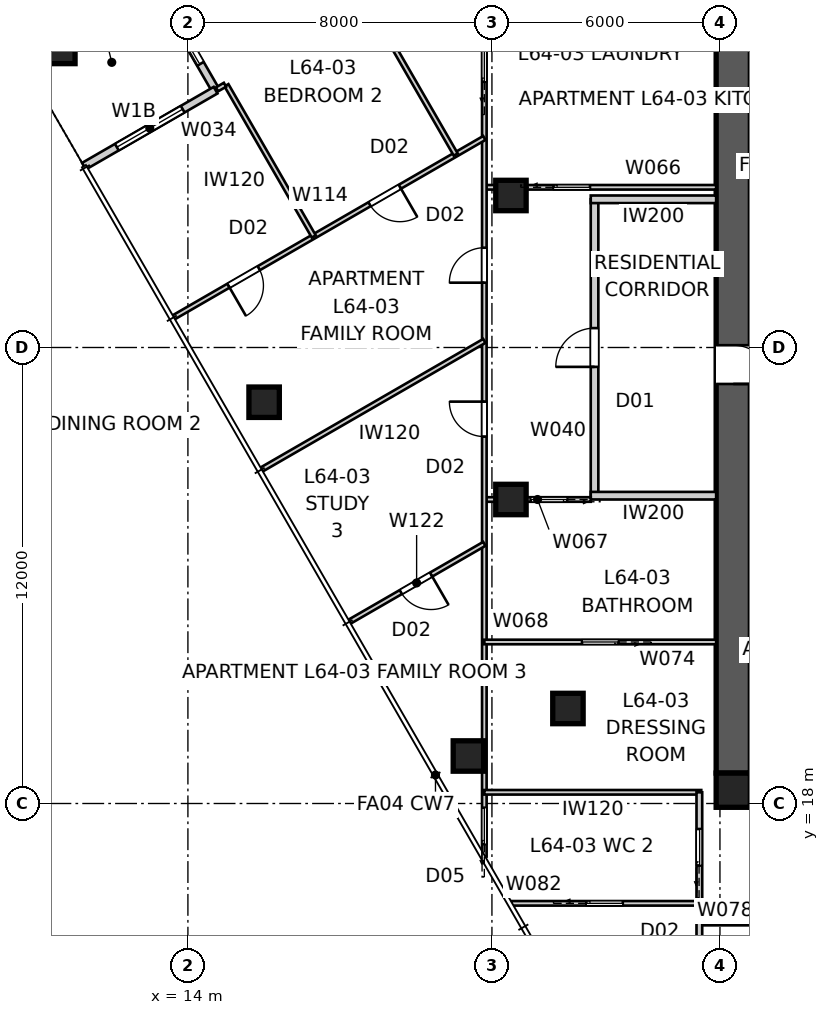
"""IFC4 building model, lengths in metres.
Left out: names, types, materials, properties, quantities, classifications, styles, units other than length and angle.
Written with IfcOpenShell. Run it as: python <this file> out.ifc"""

import sys

from ifc_helpers import new_model, si_unit, direction, frame, frame_2d, origin, origin_2d, place, context, subcontext, project, spatial, polyline, rectangle, outline, extrude, element, fill, save


model = new_model("IFC4")
c1 = context("Model", 3, precision=1e-05, world=origin(), true_north=direction((0.0, 1.0)))
c2 = subcontext(c1, "Body", "Model", "MODEL_VIEW")
j1 = project(units=[si_unit("LENGTHUNIT", "METRE"), si_unit("PLANEANGLEUNIT", "RADIAN")], contexts=[c1])
p1 = place(None, origin())
s1 = spatial("IfcSite", under=j1, at=p1, CompositionType="ELEMENT")
p2 = place(p1, origin())
s2 = spatial("IfcBuilding", under=s1, at=p2, CompositionType="ELEMENT")
p3 = place(p2, frame((0.0, 0.0, 232.0)))
s3 = spatial("IfcBuildingStorey", under=s2, at=p3, CompositionType="ELEMENT", Elevation=232.0)
p4 = place(p3, frame((51.2, 18.35, 0.0), z_axis=(0.0, 0.0, 1.0), x_axis=(-1.0, 0.0, 0.0)))
e1 = element("IfcWall", 1, at=p4, inside=s3, PredefinedType="SHEAR", context=c2, shape_type="SweptSolid", body=[
    extrude(outline(polyline([(0.0, -0.45), (22.4, -0.45), (22.4, -0.025), (22.85, -0.025), (22.85, 0.025), (22.4, 0.025), (22.4, 0.45), (0.0, 0.45), (0.0, 0.025), (-0.45, 0.025), (-0.45, -0.025), (0.0, -0.025), (0.0, -0.45)])), origin(), (0.0, 0.0, 1.0), 3.4),
])
p5 = place(p3, frame((28.35, 41.2, 0.0), z_axis=(0.0, 0.0, 1.0), x_axis=(0.0, -1.0, 0.0)))
e2 = element("IfcWall", 2, at=p5, inside=s3, PredefinedType="SHEAR", context=c2, shape_type="SweptSolid", body=[
    extrude(outline(polyline([(0.0, -0.45), (22.4, -0.45), (22.4, -0.025), (22.85, -0.025), (22.85, 0.025), (22.4, 0.025), (22.4, 0.45), (0.0, 0.45), (0.0, 0.025), (-0.45, 0.025), (-0.45, -0.025), (0.0, -0.025), (0.0, -0.45)])), origin(), (0.0, 0.0, 1.0), 3.4),
])
p6 = place(p5, frame((11.14, 0.0, 0.0)))
e3 = element("IfcOpeningElement", 3, at=p6, cuts=e2, PredefinedType="OPENING", context=c2, shape_type="SweptSolid", body=[
    extrude(rectangle(XDim=1.02, YDim=2.4, at=frame_2d((0.51, 1.2))), frame((0.0, 0.46, 0.0), z_axis=(0.0, -1.0, 0.0), x_axis=(1.0, 0.0, 0.0)), (0.0, 0.0, 1.0), 0.92),
])
p7 = place(p3, frame((28.35, 18.35, 0.0), z_axis=(0.0, 0.0, 1.0), x_axis=(1.0, 0.0, 0.0)))
e4 = element("IfcColumn", 4, at=p7, inside=s3, PredefinedType="COLUMN", context=c2, shape_type="SweptSolid", body=[
    extrude(rectangle(XDim=0.9, YDim=0.9, at=origin_2d()), origin(), (0.0, 0.0, 1.0), 3.4),
])
for number, where, z_axis, x_axis in (
    (5, (10.63, 37.87, 0.0), (0.0, 0.0, 1.0), (1.0, 0.0, 0.0)),
    (6, (16.005, 28.56, 0.0), (0.0, 0.0, 1.0), (1.0, 0.0, 0.0)),
    (7, (21.38, 19.25, 0.0), (0.0, 0.0, 1.0), (1.0, 0.0, 0.0)),
):
    element("IfcColumn", number, at=place(p3, frame(where, z_axis=z_axis, x_axis=x_axis)), inside=s3, PredefinedType="COLUMN", context=c2, shape_type="SweptSolid", body=[
        extrude(rectangle(XDim=0.8, YDim=0.8, at=origin_2d()), origin(), (0.0, 0.0, 1.0), 3.2),
    ])
for number, where, z_axis, x_axis in (
    (8, (22.5, 34.0, 0.0), (0.0, 0.0, 1.0), (1.0, 0.0, 0.0)),
    (9, (22.5, 26.0, 0.0), (0.0, 0.0, 1.0), (1.0, 0.0, 0.0)),
    (10, (24.0, 20.5, 0.0), (0.0, 0.0, 1.0), (1.0, 0.0, 0.0)),
):
    element("IfcColumn", number, at=place(p3, frame(where, z_axis=z_axis, x_axis=x_axis)), inside=s3, PredefinedType="COLUMN", context=c2, shape_type="SweptSolid", body=[
        extrude(rectangle(XDim=0.8, YDim=0.8, at=origin_2d()), origin(), (0.0, 0.0, 1.0), 3.4),
    ])
p8 = place(p3, frame((12.729, 40.236, 0.0), z_axis=(0.0, 0.0, 1.0), x_axis=(0.49999894854, -0.866026010844, 0.0)))
e11 = element("IfcWall", 11, at=p8, inside=s3, PredefinedType="SOLIDWALL", context=c2, shape_type="SweptSolid", body=[
    extrude(rectangle(XDim=4.0, YDim=0.2, at=frame_2d((2.0, 0.0))), origin(), (0.0, 0.0, 1.0), 3.2),
])
p9 = place(p8, frame((0.8, 0.0, 0.0)))
e12 = element("IfcOpeningElement", 12, at=p9, cuts=e11, PredefinedType="OPENING", context=c2, shape_type="SweptSolid", body=[
    extrude(rectangle(XDim=2.4, YDim=2.1, at=frame_2d((1.2, 1.05))), frame((0.0, 0.11, 0.0), z_axis=(0.0, -1.0, 0.0), x_axis=(1.0, 0.0, 0.0)), (0.0, 0.0, 1.0), 0.22),
])
p10 = place(p3, frame((14.729, 36.771, 0.0), z_axis=(0.0, 0.0, 1.0), x_axis=(-0.866026010844, -0.49999894854, 0.0)))
e13 = element("IfcWall", 13, at=p10, inside=s3, PredefinedType="SOLIDWALL", context=c2, shape_type="SweptSolid", body=[
    extrude(rectangle(XDim=4.0, YDim=0.2, at=frame_2d((2.0, 0.0))), origin(), (0.0, 0.0, 1.0), 3.2),
])
p11 = place(p10, frame((1.0, 0.0, 0.4)))
e14 = element("IfcOpeningElement", 14, at=p11, cuts=e13, PredefinedType="OPENING", context=c2, shape_type="SweptSolid", body=[
    extrude(rectangle(XDim=2.0, YDim=1.8, at=frame_2d((1.0, 0.9))), frame((0.0, 0.11, 0.0), z_axis=(0.0, -1.0, 0.0), x_axis=(1.0, 0.0, 0.0)), (0.0, 0.0, 1.0), 0.22),
])
p12 = place(p3, frame((24.7, 26.1, 0.0), z_axis=(0.0, 0.0, 1.0), x_axis=(0.0, 1.0, 0.0)))
e15 = element("IfcWall", 15, at=p12, inside=s3, PredefinedType="PARTITIONING", context=c2, shape_type="SweptSolid", body=[
    extrude(rectangle(XDim=7.8, YDim=0.2, at=frame_2d((3.9, 0.0))), origin(), (0.0, 0.0, 1.0), 3.2),
])
p13 = place(p12, frame((3.39, 0.0, 0.0)))
e16 = element("IfcOpeningElement", 16, at=p13, cuts=e15, PredefinedType="OPENING", context=c2, shape_type="SweptSolid", body=[
    extrude(rectangle(XDim=1.02, YDim=2.34, at=frame_2d((0.51, 1.17))), frame((0.0, 0.11, 0.0), z_axis=(0.0, -1.0, 0.0), x_axis=(1.0, 0.0, 0.0)), (0.0, 0.0, 1.0), 0.22),
])
for number, where, z_axis, x_axis in (
    (17, (27.9, 33.9, 0.0), (0.0, 0.0, 1.0), (-1.0, 0.0, 0.0)),
    (18, (27.9, 26.1, 0.0), (0.0, 0.0, 1.0), (-1.0, 0.0, 0.0)),
):
    element("IfcWall", number, at=place(p3, frame(where, z_axis=z_axis, x_axis=x_axis)), inside=s3, PredefinedType="PARTITIONING", context=c2, shape_type="SweptSolid", body=[
        extrude(rectangle(XDim=3.3, YDim=0.2, at=frame_2d((1.65, 0.0))), origin(), (0.0, 0.0, 1.0), 3.2),
    ])
p14 = place(p3, frame((21.8, 34.216, 0.0), z_axis=(0.0, 0.0, 1.0), x_axis=(1.0, 0.0, 0.0)))
e19 = element("IfcWall", 19, at=p14, inside=s3, PredefinedType="PARTITIONING", context=c2, shape_type="SweptSolid", body=[
    extrude(rectangle(XDim=6.1, YDim=0.12, at=frame_2d((3.05, 0.0))), origin(), (0.0, 0.0, 1.0), 3.2),
])
p15 = place(p14, frame((1.82, 0.0, 0.0)))
e20 = element("IfcOpeningElement", 20, at=p15, cuts=e19, PredefinedType="OPENING", context=c2, shape_type="SweptSolid", body=[
    extrude(rectangle(XDim=0.96, YDim=2.1, at=frame_2d((0.48, 1.05))), frame((0.0, 0.07, 0.0), z_axis=(0.0, -1.0, 0.0), x_axis=(1.0, 0.0, 0.0)), (0.0, 0.0, 1.0), 0.14),
])
p16 = place(p3, frame((24.6, 26.0, 0.0), z_axis=(0.0, 0.0, 1.0), x_axis=(-1.0, 0.0, 0.0)))
e21 = element("IfcWall", 21, at=p16, inside=s3, PredefinedType="PARTITIONING", context=c2, shape_type="SweptSolid", body=[
    extrude(rectangle(XDim=2.8, YDim=0.12, at=frame_2d((1.4, 0.0))), origin(), (0.0, 0.0, 1.0), 3.2),
])
p17 = place(p16, frame((0.62, 0.0, 0.0)))
e22 = element("IfcOpeningElement", 22, at=p17, cuts=e21, PredefinedType="OPENING", context=c2, shape_type="SweptSolid", body=[
    extrude(rectangle(XDim=0.96, YDim=2.1, at=frame_2d((0.48, 1.05))), frame((0.0, 0.07, 0.0), z_axis=(0.0, -1.0, 0.0), x_axis=(1.0, 0.0, 0.0)), (0.0, 0.0, 1.0), 0.14),
])
p18 = place(p3, frame((21.8, 16.603, 0.0), z_axis=(0.0, 0.0, 1.0), x_axis=(0.0, 1.0, 0.0)))
e23 = element("IfcWall", 23, at=p18, inside=s3, PredefinedType="PARTITIONING", context=c2, shape_type="SweptSolid", body=[
    extrude(rectangle(XDim=28.823, YDim=0.12, at=frame_2d((14.412, 0.0))), origin(), (0.0, 0.0, 1.0), 3.2),
])
p19 = place(p18, frame((11.052, 0.0, 0.0)))
e24 = element("IfcOpeningElement", 24, at=p19, cuts=e23, PredefinedType="OPENING", context=c2, shape_type="SweptSolid", body=[
    extrude(rectangle(XDim=0.92, YDim=2.34, at=frame_2d((0.46, 1.17))), frame((0.0, 0.07, 0.0), z_axis=(0.0, -1.0, 0.0), x_axis=(1.0, 0.0, 0.0)), (0.0, 0.0, 1.0), 0.14),
])
p20 = place(p18, frame((15.102, 0.0, 0.0)))
e25 = element("IfcOpeningElement", 25, at=p20, cuts=e23, PredefinedType="OPENING", context=c2, shape_type="SweptSolid", body=[
    extrude(rectangle(XDim=0.92, YDim=2.34, at=frame_2d((0.46, 1.17))), frame((0.0, 0.07, 0.0), z_axis=(0.0, -1.0, 0.0), x_axis=(1.0, 0.0, 0.0)), (0.0, 0.0, 1.0), 0.14),
])
p21 = place(p18, frame((20.389, 0.0, 0.0)))
e26 = element("IfcOpeningElement", 26, at=p21, cuts=e23, PredefinedType="OPENING", context=c2, shape_type="SweptSolid", body=[
    extrude(rectangle(XDim=0.96, YDim=2.1, at=frame_2d((0.48, 1.05))), frame((0.0, 0.07, 0.0), z_axis=(0.0, -1.0, 0.0), x_axis=(1.0, 0.0, 0.0)), (0.0, 0.0, 1.0), 0.14),
])
p22 = place(p18, frame((0.326, 0.0, 0.0)))
e27 = element("IfcOpeningElement", 27, at=p22, cuts=e23, PredefinedType="OPENING", context=c2, shape_type="SweptSolid", body=[
    extrude(rectangle(XDim=0.96, YDim=2.1, at=frame_2d((0.48, 1.05))), frame((0.0, 0.07, 0.0), z_axis=(0.0, -1.0, 0.0), x_axis=(1.0, 0.0, 0.0)), (0.0, 0.0, 1.0), 0.14),
])
p23 = place(p3, frame((27.9, 22.25, 0.0), z_axis=(0.0, 0.0, 1.0), x_axis=(-1.0, 0.0, 0.0)))
e28 = element("IfcWall", 28, at=p23, inside=s3, PredefinedType="PARTITIONING", context=c2, shape_type="SweptSolid", body=[
    extrude(rectangle(XDim=6.1, YDim=0.12, at=frame_2d((3.05, 0.0))), origin(), (0.0, 0.0, 1.0), 3.2),
])
p24 = place(p23, frame((2.57, 0.0, 0.0)))
e29 = element("IfcOpeningElement", 29, at=p24, cuts=e28, PredefinedType="OPENING", context=c2, shape_type="SweptSolid", body=[
    extrude(rectangle(XDim=0.96, YDim=2.1, at=frame_2d((0.48, 1.05))), frame((0.0, 0.07, 0.0), z_axis=(0.0, -1.0, 0.0), x_axis=(1.0, 0.0, 0.0)), (0.0, 0.0, 1.0), 0.14),
])
p25 = place(p3, frame((27.508, 18.295, 0.0), z_axis=(0.0, 0.0, 1.0), x_axis=(-1.0, 0.0, 0.0)))
e30 = element("IfcWall", 30, at=p25, inside=s3, PredefinedType="PARTITIONING", context=c2, shape_type="SweptSolid", body=[
    extrude(rectangle(XDim=5.708, YDim=0.12, at=frame_2d((2.854, 0.0))), origin(), (0.0, 0.0, 1.0), 3.2),
])
p26 = place(p3, frame((32.361, 14.869, 0.0), z_axis=(0.0, 0.0, 1.0), x_axis=(-1.0, 0.0, 0.0)))
e31 = element("IfcWall", 31, at=p26, inside=s3, PredefinedType="SOLIDWALL", context=c2, shape_type="SweptSolid", body=[
    extrude(rectangle(XDim=4.903, YDim=0.15, at=frame_2d((2.452, 0.0))), origin(), (0.0, 0.0, 1.0), 3.2),
])
p27 = place(p3, frame((27.458, 11.8, 0.0), z_axis=(0.0, 0.0, 1.0), x_axis=(0.0, 1.0, 0.0)))
e32 = element("IfcWall", 32, at=p27, inside=s3, PredefinedType="SOLIDWALL", context=c2, shape_type="SweptSolid", body=[
    extrude(rectangle(XDim=6.495, YDim=0.15, at=frame_2d((3.248, 0.0))), origin(), (0.0, 0.0, 1.0), 3.2),
])
p28 = place(p27, frame((4.569, 0.0, 0.0)))
e33 = element("IfcOpeningElement", 33, at=p28, cuts=e32, PredefinedType="OPENING", context=c2, shape_type="SweptSolid", body=[
    extrude(rectangle(XDim=0.96, YDim=2.0, at=frame_2d((0.48, 1.0))), frame((0.0, 0.085, 0.0), z_axis=(0.0, -1.0, 0.0), x_axis=(1.0, 0.0, 0.0)), (0.0, 0.0, 1.0), 0.17),
])
p29 = place(p27, frame((1.074, 0.0, 0.0)))
e34 = element("IfcOpeningElement", 34, at=p29, cuts=e32, PredefinedType="OPENING", context=c2, shape_type="SweptSolid", body=[
    extrude(rectangle(XDim=0.92, YDim=2.34, at=frame_2d((0.46, 1.17))), frame((0.0, 0.085, 0.0), z_axis=(0.0, -1.0, 0.0), x_axis=(1.0, 0.0, 0.0)), (0.0, 0.0, 1.0), 0.17),
])
p30 = place(p3, frame((22.51, 15.373, 0.0), z_axis=(0.0, 0.0, 1.0), x_axis=(1.0, 0.0, 0.0)))
e35 = element("IfcWall", 35, at=p30, inside=s3, PredefinedType="PARTITIONING", context=c2, shape_type="SweptSolid", body=[
    extrude(rectangle(XDim=4.918, YDim=0.12, at=frame_2d((2.459, 0.0))), origin(), (0.0, 0.0, 1.0), 3.2),
])
p31 = place(p30, frame((1.973, 0.0, 0.0)))
e36 = element("IfcOpeningElement", 36, at=p31, cuts=e35, PredefinedType="OPENING", context=c2, shape_type="SweptSolid", body=[
    extrude(rectangle(XDim=0.96, YDim=2.1, at=frame_2d((0.48, 1.05))), frame((0.0, 0.07, 0.0), z_axis=(0.0, -1.0, 0.0), x_axis=(1.0, 0.0, 0.0)), (0.0, 0.0, 1.0), 0.14),
])
p32 = place(p3, frame((21.8, 35.514, 0.0), z_axis=(0.0, 0.0, 1.0), x_axis=(-0.86602907136, -0.49999364752, 0.0)))
e37 = element("IfcWall", 37, at=p32, inside=s3, PredefinedType="PARTITIONING", context=c2, shape_type="SweptSolid", body=[
    extrude(rectangle(XDim=9.455, YDim=0.12, at=frame_2d((4.728, 0.0))), origin(), (0.0, 0.0, 1.0), 3.2),
])
p33 = place(p32, frame((6.854, 0.0, 0.0)))
e38 = element("IfcOpeningElement", 38, at=p33, cuts=e37, PredefinedType="OPENING", context=c2, shape_type="SweptSolid", body=[
    extrude(rectangle(XDim=0.92, YDim=2.34, at=frame_2d((0.46, 1.17))), frame((0.0, 0.07, 0.0), z_axis=(0.0, -1.0, 0.0), x_axis=(1.0, 0.0, 0.0)), (0.0, 0.0, 1.0), 0.14),
])
p34 = place(p32, frame((2.566, 0.0, 0.0)))
e39 = element("IfcOpeningElement", 39, at=p34, cuts=e37, PredefinedType="OPENING", context=c2, shape_type="SweptSolid", body=[
    extrude(rectangle(XDim=0.92, YDim=2.34, at=frame_2d((0.46, 1.17))), frame((0.0, 0.07, 0.0), z_axis=(0.0, -1.0, 0.0), x_axis=(1.0, 0.0, 0.0)), (0.0, 0.0, 1.0), 0.14),
])
p35 = place(p3, frame((16.754, 42.513, 0.0), z_axis=(0.0, 0.0, 1.0), x_axis=(0.500017009237, -0.866015583274, 0.0)))
e40 = element("IfcWall", 40, at=p35, inside=s3, PredefinedType="PARTITIONING", context=c2, shape_type="SweptSolid", body=[
    extrude(rectangle(XDim=8.586, YDim=0.12, at=frame_2d((4.293, 0.0))), origin(), (0.0, 0.0, 1.0), 3.2),
])
p36 = place(p3, frame((17.312, 32.922, 0.0), z_axis=(0.0, 0.0, 1.0), x_axis=(-0.499984590049, 0.866034300541, 0.0)))
e41 = element("IfcWall", 41, at=p36, inside=s3, PredefinedType="PARTITIONING", context=c2, shape_type="SweptSolid", body=[
    extrude(rectangle(XDim=4.595, YDim=0.12, at=frame_2d((2.298, 0.0))), origin(), (0.0, 0.0, 1.0), 3.2),
])
p37 = place(p3, frame((14.976, 36.914, 0.0), z_axis=(0.0, 0.0, 1.0), x_axis=(-0.86640078905, -0.499349249257, 0.0)))
e42 = element("IfcWall", 42, at=p37, inside=s3, PredefinedType="PARTITIONING", context=c2, shape_type="SweptSolid", body=[
    extrude(rectangle(XDim=0.245, YDim=0.12, at=frame_2d((0.123, 0.0))), origin(), (0.0, 0.0, 1.0), 3.2),
])
p38 = place(p3, frame((21.8, 30.173, 0.0), z_axis=(0.0, 0.0, 1.0), x_axis=(-0.866020204108, -0.500009005995, 0.0)))
e43 = element("IfcWall", 43, at=p38, inside=s3, PredefinedType="PARTITIONING", context=c2, shape_type="SweptSolid", body=[
    extrude(rectangle(XDim=6.785, YDim=0.12, at=frame_2d((3.393, 0.0))), origin(), (0.0, 0.0, 1.0), 3.2),
])
p39 = place(p3, frame((21.8, 24.833, 0.0), z_axis=(0.0, 0.0, 1.0), x_axis=(-0.866025520146, -0.499999798456, 0.0)))
e44 = element("IfcWall", 44, at=p39, inside=s3, PredefinedType="PARTITIONING", context=c2, shape_type="SweptSolid", body=[
    extrude(rectangle(XDim=4.115, YDim=0.12, at=frame_2d((2.057, 0.0))), origin(), (0.0, 0.0, 1.0), 3.2),
])
p40 = place(p39, frame((1.617, 0.0, 0.0)))
e45 = element("IfcOpeningElement", 45, at=p40, cuts=e44, PredefinedType="OPENING", context=c2, shape_type="SweptSolid", body=[
    extrude(rectangle(XDim=0.92, YDim=2.34, at=frame_2d((0.46, 1.17))), frame((0.0, 0.07, 0.0), z_axis=(0.0, -1.0, 0.0), x_axis=(1.0, 0.0, 0.0)), (0.0, 0.0, 1.0), 0.14),
])
p41 = place(p9, origin())
e46 = element("IfcDoor", 46, at=p41, inside=s3, OperationType="SLIDING_TO_LEFT", PredefinedType="DOOR", context=c2, shape_type="SweptSolid", body=[
    extrude(rectangle(XDim=2.4, YDim=2.1, at=frame_2d((1.2, 1.05))), frame((0.0, 0.025, 0.0), z_axis=(0.0, -1.0, 0.0), x_axis=(1.0, 0.0, 0.0)), (0.0, 0.0, 1.0), 0.05),
])
fill(e12, e46)
p42 = place(p11, origin())
e47 = element("IfcWindow", 47, at=p42, inside=s3, PartitioningType="SINGLE_PANEL", PredefinedType="WINDOW", context=c2, shape_type="SweptSolid", body=[
    extrude(rectangle(XDim=2.0, YDim=1.8, at=frame_2d((1.0, 0.9))), frame((0.0, 0.03, 0.0), z_axis=(0.0, -1.0, 0.0), x_axis=(1.0, 0.0, 0.0)), (0.0, 0.0, 1.0), 0.06),
])
fill(e14, e47)
p43 = place(p13, origin())
e48 = element("IfcDoor", 48, at=p43, inside=s3, OperationType="SINGLE_SWING_LEFT", PredefinedType="DOOR", context=c2, shape_type="SweptSolid", body=[
    extrude(rectangle(XDim=1.02, YDim=2.34, at=frame_2d((0.51, 1.17))), frame((0.0, 0.025, 0.0), z_axis=(0.0, -1.0, 0.0), x_axis=(1.0, 0.0, 0.0)), (0.0, 0.0, 1.0), 0.05),
])
fill(e16, e48)
p44 = place(p15, origin())
e49 = element("IfcDoor", 49, at=p44, inside=s3, OperationType="SLIDING_TO_LEFT", PredefinedType="DOOR", context=c2, shape_type="SweptSolid", body=[
    extrude(rectangle(XDim=0.96, YDim=2.1, at=frame_2d((0.48, 1.05))), frame((0.0, 0.025, 0.0), z_axis=(0.0, -1.0, 0.0), x_axis=(1.0, 0.0, 0.0)), (0.0, 0.0, 1.0), 0.05),
])
fill(e20, e49)
p45 = place(p19, origin())
e50 = element("IfcDoor", 50, at=p45, inside=s3, OperationType="SINGLE_SWING_RIGHT", PredefinedType="DOOR", context=c2, shape_type="SweptSolid", body=[
    extrude(rectangle(XDim=0.92, YDim=2.34, at=frame_2d((0.46, 1.17))), frame((0.0, 0.025, 0.0), z_axis=(0.0, -1.0, 0.0), x_axis=(1.0, 0.0, 0.0)), (0.0, 0.0, 1.0), 0.05),
])
fill(e24, e50)
p46 = place(p20, origin())
e51 = element("IfcDoor", 51, at=p46, inside=s3, OperationType="SINGLE_SWING_LEFT", PredefinedType="DOOR", context=c2, shape_type="SweptSolid", body=[
    extrude(rectangle(XDim=0.92, YDim=2.34, at=frame_2d((0.46, 1.17))), frame((0.0, 0.025, 0.0), z_axis=(0.0, -1.0, 0.0), x_axis=(1.0, 0.0, 0.0)), (0.0, 0.0, 1.0), 0.05),
])
fill(e25, e51)
p47 = place(p17, origin())
e52 = element("IfcDoor", 52, at=p47, inside=s3, OperationType="SLIDING_TO_LEFT", PredefinedType="DOOR", context=c2, shape_type="SweptSolid", body=[
    extrude(rectangle(XDim=0.96, YDim=2.1, at=frame_2d((0.48, 1.05))), frame((0.0, 0.025, 0.0), z_axis=(0.0, -1.0, 0.0), x_axis=(1.0, 0.0, 0.0)), (0.0, 0.0, 1.0), 0.05),
])
fill(e22, e52)
p48 = place(p21, origin())
e53 = element("IfcDoor", 53, at=p48, inside=s3, OperationType="SLIDING_TO_LEFT", PredefinedType="DOOR", context=c2, shape_type="SweptSolid", body=[
    extrude(rectangle(XDim=0.96, YDim=2.1, at=frame_2d((0.48, 1.05))), frame((0.0, 0.025, 0.0), z_axis=(0.0, -1.0, 0.0), x_axis=(1.0, 0.0, 0.0)), (0.0, 0.0, 1.0), 0.05),
])
fill(e26, e53)
p49 = place(p40, origin())
e54 = element("IfcDoor", 54, at=p49, inside=s3, OperationType="SINGLE_SWING_LEFT", PredefinedType="DOOR", context=c2, shape_type="SweptSolid", body=[
    extrude(rectangle(XDim=0.92, YDim=2.34, at=frame_2d((0.46, 1.17))), frame((0.0, 0.025, 0.0), z_axis=(0.0, -1.0, 0.0), x_axis=(1.0, 0.0, 0.0)), (0.0, 0.0, 1.0), 0.05),
])
fill(e45, e54)
p50 = place(p33, origin())
e55 = element("IfcDoor", 55, at=p50, inside=s3, OperationType="SINGLE_SWING_RIGHT", PredefinedType="DOOR", context=c2, shape_type="SweptSolid", body=[
    extrude(rectangle(XDim=0.92, YDim=2.34, at=frame_2d((0.46, 1.17))), frame((0.0, 0.025, 0.0), z_axis=(0.0, -1.0, 0.0), x_axis=(1.0, 0.0, 0.0)), (0.0, 0.0, 1.0), 0.05),
])
fill(e38, e55)
p51 = place(p34, origin())
e56 = element("IfcDoor", 56, at=p51, inside=s3, OperationType="SINGLE_SWING_LEFT", PredefinedType="DOOR", context=c2, shape_type="SweptSolid", body=[
    extrude(rectangle(XDim=0.92, YDim=2.34, at=frame_2d((0.46, 1.17))), frame((0.0, 0.025, 0.0), z_axis=(0.0, -1.0, 0.0), x_axis=(1.0, 0.0, 0.0)), (0.0, 0.0, 1.0), 0.05),
])
fill(e39, e56)
p52 = place(p24, origin())
e57 = element("IfcDoor", 57, at=p52, inside=s3, OperationType="SLIDING_TO_LEFT", PredefinedType="DOOR", context=c2, shape_type="SweptSolid", body=[
    extrude(rectangle(XDim=0.96, YDim=2.1, at=frame_2d((0.48, 1.05))), frame((0.0, 0.025, 0.0), z_axis=(0.0, -1.0, 0.0), x_axis=(1.0, 0.0, 0.0)), (0.0, 0.0, 1.0), 0.05),
])
fill(e29, e57)
p53 = place(p22, origin())
e58 = element("IfcDoor", 58, at=p53, inside=s3, OperationType="SLIDING_TO_LEFT", PredefinedType="DOOR", context=c2, shape_type="SweptSolid", body=[
    extrude(rectangle(XDim=0.96, YDim=2.1, at=frame_2d((0.48, 1.05))), frame((0.0, 0.025, 0.0), z_axis=(0.0, -1.0, 0.0), x_axis=(1.0, 0.0, 0.0)), (0.0, 0.0, 1.0), 0.05),
])
fill(e27, e58)
p54 = place(p31, origin())
e59 = element("IfcDoor", 59, at=p54, inside=s3, OperationType="SLIDING_TO_LEFT", PredefinedType="DOOR", context=c2, shape_type="SweptSolid", body=[
    extrude(rectangle(XDim=0.96, YDim=2.1, at=frame_2d((0.48, 1.05))), frame((0.0, 0.025, 0.0), z_axis=(0.0, -1.0, 0.0), x_axis=(1.0, 0.0, 0.0)), (0.0, 0.0, 1.0), 0.05),
])
fill(e36, e59)
p55 = place(p28, origin())
e60 = element("IfcDoor", 60, at=p55, inside=s3, OperationType="SLIDING_TO_LEFT", PredefinedType="DOOR", context=c2, shape_type="SweptSolid", body=[
    extrude(rectangle(XDim=0.96, YDim=2.0, at=frame_2d((0.48, 1.0))), frame((0.0, 0.025, 0.0), z_axis=(0.0, -1.0, 0.0), x_axis=(1.0, 0.0, 0.0)), (0.0, 0.0, 1.0), 0.05),
])
fill(e33, e60)
p56 = place(p6, origin())
e61 = element("IfcDoor", 61, at=p56, inside=s3, OperationType="SINGLE_SWING_RIGHT", PredefinedType="DOOR", context=c2, shape_type="SweptSolid", body=[
    extrude(rectangle(XDim=1.02, YDim=2.4, at=frame_2d((0.51, 1.2))), frame((0.0, 0.025, 0.0), z_axis=(0.0, -1.0, 0.0), x_axis=(1.0, 0.0, 0.0)), (0.0, 0.0, 1.0), 0.05),
])
fill(e3, e61)
save(model, sys.argv[1])
